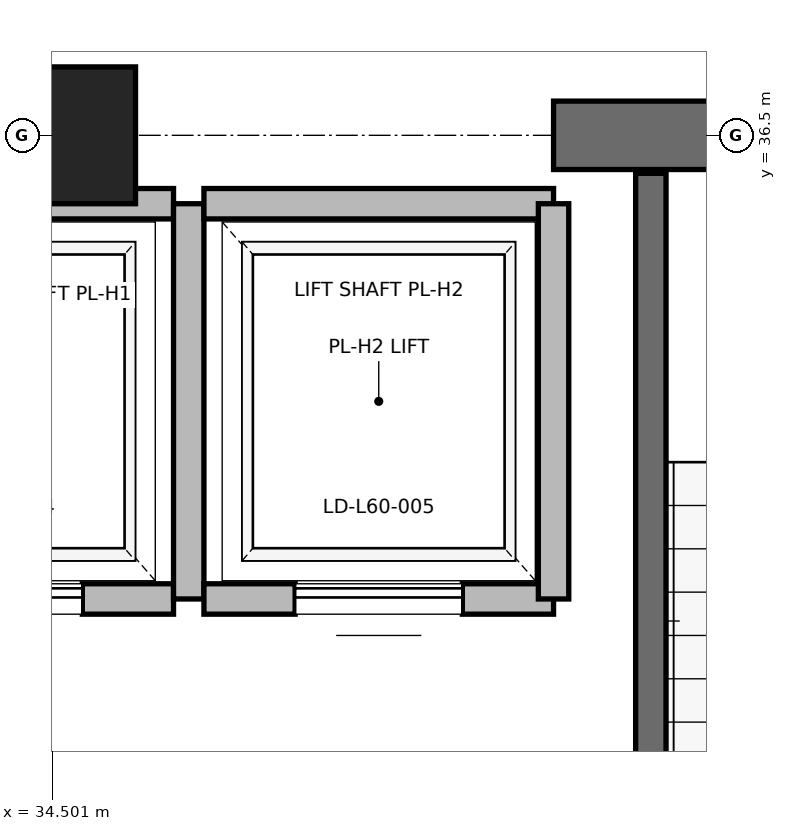
"""IFC4 building model, lengths in metres.
Left out: names, types, materials, properties, quantities, classifications, styles, units other than length and angle.
Written with IfcOpenShell. Run it as: python <this file> out.ifc"""

import sys

from ifc_helpers import new_model, si_unit, direction, frame, frame_2d, origin, origin_2d, place, context, subcontext, project, spatial, rectangle, extrude, element, fill, save


model = new_model("IFC4")
c1 = context("Model", 3, precision=1e-05, world=origin(), true_north=direction((0.0, 1.0)))
c2 = subcontext(c1, "Body", "Model", "MODEL_VIEW")
j1 = project(units=[si_unit("LENGTHUNIT", "METRE"), si_unit("PLANEANGLEUNIT", "RADIAN")], contexts=[c1])
p1 = place(None, origin())
s1 = spatial("IfcSite", under=j1, at=p1, CompositionType="ELEMENT")
p2 = place(p1, origin())
s2 = spatial("IfcBuilding", under=s1, at=p2, CompositionType="ELEMENT")
p3 = place(p2, frame((0.0, 0.0, 259.2)))
s3 = spatial("IfcBuildingStorey", under=s2, at=p3, CompositionType="ELEMENT", Elevation=259.2)
p4 = place(p3, frame((34.6, 36.5, 0.0), z_axis=(0.0, 0.0, 1.0), x_axis=(1.0, 0.0, 0.0)))
e1 = element("IfcColumn", 1, at=p4, inside=s3, PredefinedType="PILASTER", context=c2, shape_type="SweptSolid", body=[
    extrude(rectangle(XDim=0.9, YDim=0.9, at=origin_2d()), origin(), (0.0, 0.0, 1.0), 4.0),
])
p5 = place(p3, frame((29.0, 36.5, 0.0), z_axis=(0.0, 0.0, 1.0), x_axis=(1.0, 0.0, 0.0)))
e2 = element("IfcWall", 2, at=p5, inside=s3, PredefinedType="SHEAR", context=c2, shape_type="SweptSolid", body=[
    extrude(rectangle(XDim=5.8, YDim=0.45, at=frame_2d((2.9, 0.0))), origin(), (0.0, 0.0, 1.0), 3.785),
])
p6 = place(p3, frame((37.8, 36.5, 0.0), z_axis=(0.0, 0.0, 1.0), x_axis=(1.0, 0.0, 0.0)))
e3 = element("IfcWall", 3, at=p6, inside=s3, PredefinedType="SHEAR", context=c2, shape_type="SweptSolid", body=[
    extrude(rectangle(XDim=4.4, YDim=0.45, at=frame_2d((2.2, 0.0))), origin(), (0.0, 0.0, 1.0), 3.785),
])
p7 = place(p6, frame((1.65, 0.0, 0.0)))
e4 = element("IfcOpeningElement", 4, at=p7, cuts=e3, PredefinedType="OPENING", context=c2, shape_type="SweptSolid", body=[
    extrude(rectangle(XDim=1.1, YDim=2.15, at=frame_2d((0.55, 1.075))), frame((0.0, 0.225, 0.0), z_axis=(0.0, -1.0, 0.0), x_axis=(1.0, 0.0, 0.0)), (0.0, 0.0, 1.0), 0.45),
])
p8 = place(p3, frame((38.44, 27.38, 0.0), z_axis=(0.0, 0.0, 1.0), x_axis=(0.0, 1.0, 0.0)))
e5 = element("IfcWall", 5, at=p8, inside=s3, PredefinedType="SOLIDWALL", context=c2, shape_type="SweptSolid", body=[
    extrude(rectangle(XDim=8.87, YDim=0.2, at=frame_2d((4.435, 0.0))), origin(), (0.0, 0.0, 1.0), 3.785),
])
p9 = place(p3, frame((33.0, 33.45, 0.0), z_axis=(0.0, 0.0, 1.0), x_axis=(1.0, 0.0, 0.0)))
e6 = element("IfcWall", 6, at=p9, inside=s3, PredefinedType="SOLIDWALL", context=c2, shape_type="SweptSolid", body=[
    extrude(rectangle(XDim=2.3, YDim=0.2, at=frame_2d((1.15, 0.0))), origin(), (0.0, 0.0, 1.0), 3.785),
])
p10 = place(p9, frame((0.6, 0.0, 0.0)))
e7 = element("IfcOpeningElement", 7, at=p10, cuts=e6, PredefinedType="OPENING", context=c2, shape_type="SweptSolid", body=[
    extrude(rectangle(XDim=1.1, YDim=2.2, at=frame_2d((0.55, 1.1))), frame((0.0, 0.1, 0.0), z_axis=(0.0, -1.0, 0.0), x_axis=(1.0, 0.0, 0.0)), (0.0, 0.0, 1.0), 0.2),
])
p11 = place(p3, frame((35.3, 36.05, 0.0), z_axis=(0.0, 0.0, 1.0), x_axis=(-1.0, 0.0, 0.0)))
e8 = element("IfcWall", 8, at=p11, inside=s3, PredefinedType="SOLIDWALL", context=c2, shape_type="SweptSolid", body=[
    extrude(rectangle(XDim=2.3, YDim=0.2, at=frame_2d((1.15, 0.0))), origin(), (0.0, 0.0, 1.0), 2.865),
])
p12 = place(p3, frame((35.4, 33.45, 0.0), z_axis=(0.0, 0.0, 1.0), x_axis=(0.0, 1.0, 0.0)))
e9 = element("IfcWall", 9, at=p12, inside=s3, PredefinedType="SOLIDWALL", context=c2, shape_type="SweptSolid", body=[
    extrude(rectangle(XDim=2.6, YDim=0.2, at=frame_2d((1.3, 0.0))), origin(), (0.0, 0.0, 1.0), 2.865),
])
p13 = place(p3, frame((35.5, 33.45, 0.0), z_axis=(0.0, 0.0, 1.0), x_axis=(1.0, 0.0, 0.0)))
e10 = element("IfcWall", 10, at=p13, inside=s3, PredefinedType="SOLIDWALL", context=c2, shape_type="SweptSolid", body=[
    extrude(rectangle(XDim=2.3, YDim=0.2, at=frame_2d((1.15, 0.0))), origin(), (0.0, 0.0, 1.0), 3.785),
])
p14 = place(p13, frame((0.6, 0.0, 0.0)))
e11 = element("IfcOpeningElement", 11, at=p14, cuts=e10, PredefinedType="OPENING", context=c2, shape_type="SweptSolid", body=[
    extrude(rectangle(XDim=1.1, YDim=2.2, at=frame_2d((0.55, 1.1))), frame((0.0, 0.1, 0.0), z_axis=(0.0, -1.0, 0.0), x_axis=(1.0, 0.0, 0.0)), (0.0, 0.0, 1.0), 0.2),
])
p15 = place(p3, frame((37.8, 36.05, 0.0), z_axis=(0.0, 0.0, 1.0), x_axis=(-1.0, 0.0, 0.0)))
e12 = element("IfcWall", 12, at=p15, inside=s3, PredefinedType="SOLIDWALL", context=c2, shape_type="SweptSolid", body=[
    extrude(rectangle(XDim=2.3, YDim=0.2, at=frame_2d((1.15, 0.0))), origin(), (0.0, 0.0, 1.0), 2.865),
])
p16 = place(p3, frame((37.8, 33.45, 0.0), z_axis=(0.0, 0.0, 1.0), x_axis=(0.0, 1.0, 0.0)))
e13 = element("IfcWall", 13, at=p16, inside=s3, PredefinedType="SOLIDWALL", context=c2, shape_type="SweptSolid", body=[
    extrude(rectangle(XDim=2.6, YDim=0.2, at=frame_2d((1.3, 0.0))), origin(), (0.0, 0.0, 1.0), 2.865),
])
p17 = place(p10, origin())
e14 = element("IfcDoor", 14, at=p17, inside=s3, OperationType="SLIDING_TO_RIGHT", PredefinedType="DOOR", context=c2, shape_type="SweptSolid", body=[
    extrude(rectangle(XDim=1.1, YDim=2.2, at=frame_2d((0.55, 1.1))), frame((0.0, 0.025, 0.0), z_axis=(0.0, -1.0, 0.0), x_axis=(1.0, 0.0, 0.0)), (0.0, 0.0, 1.0), 0.05),
])
fill(e7, e14)
p18 = place(p14, origin())
e15 = element("IfcDoor", 15, at=p18, inside=s3, OperationType="SLIDING_TO_RIGHT", PredefinedType="DOOR", context=c2, shape_type="SweptSolid", body=[
    extrude(rectangle(XDim=1.1, YDim=2.2, at=frame_2d((0.55, 1.1))), frame((0.0, 0.025, 0.0), z_axis=(0.0, -1.0, 0.0), x_axis=(1.0, 0.0, 0.0)), (0.0, 0.0, 1.0), 0.05),
])
fill(e11, e15)
save(model, sys.argv[1])
